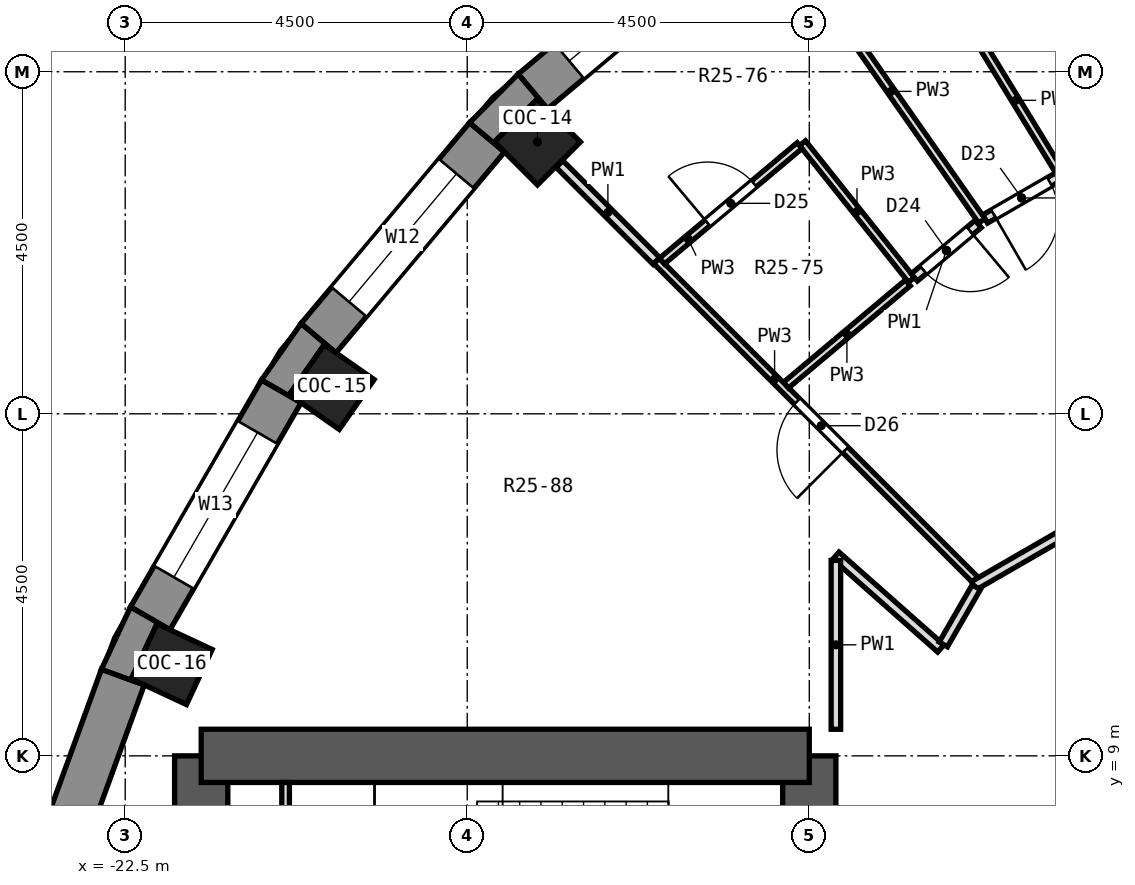
"""IFC4 building model, lengths in metres.
Left out: names, types, materials, properties, quantities, classifications, styles, units other than length and angle.
Written with IfcOpenShell. Run it as: python <this file> out.ifc"""

import sys

from ifc_helpers import new_model, si_unit, direction, frame, frame_2d, origin, origin_2d, place, context, subcontext, project, spatial, polyline, rectangle, outline, extrude, element, fill, save


model = new_model("IFC4")
c1 = context("Model", 3, precision=1e-05, world=origin(), true_north=direction((0.0, 1.0)))
c2 = subcontext(c1, "Body", "Model", "MODEL_VIEW")
j1 = project(units=[si_unit("LENGTHUNIT", "METRE"), si_unit("PLANEANGLEUNIT", "RADIAN")], contexts=[c1])
p1 = place(None, origin())
s1 = spatial("IfcSite", under=j1, at=p1, CompositionType="ELEMENT")
p2 = place(p1, origin())
s2 = spatial("IfcBuilding", under=s1, at=p2, CompositionType="ELEMENT")
p3 = place(p2, frame((0.0, 0.0, 160.8)))
s3 = spatial("IfcBuildingStorey", under=s2, at=p3, CompositionType="ELEMENT", Elevation=160.8)
for number, where, z_axis, x_axis in (
    (1, (-17.077, 17.077, 0.0), (0.0, 0.0, 1.0), (-0.707, 0.707, 0.0)),
    (2, (-19.782, 13.852, 0.0), (0.0, 0.0, 1.0), (-0.819, 0.574, 0.0)),
    (3, (-21.887, 10.206, 0.0), (0.0, 0.0, 1.0), (-0.906, 0.423, 0.0)),
):
    element("IfcColumn", number, at=place(p3, frame(where, z_axis=z_axis, x_axis=x_axis)), inside=s3, PredefinedType="COLUMN", context=c2, shape_type="SweptSolid", body=[
        extrude(rectangle(XDim=0.8, YDim=0.8, at=origin_2d()), origin(), (0.0, 0.0, 1.0), 3.3),
    ])
p4 = place(p3, frame((-13.5, -9.0, 0.0), z_axis=(0.0, 0.0, 1.0), x_axis=(0.0, 1.0, 0.0)))
e4 = element("IfcWall", 4, at=p4, inside=s3, PredefinedType="SHEAR", context=c2, shape_type="SweptSolid", body=[
    extrude(rectangle(XDim=18.0, YDim=0.7, at=frame_2d((9.0, 0.0))), origin(), (0.0, 0.0, 1.0), 3.3),
])
p5 = place(p4, frame((15.4, 0.0, 0.0)))
e5 = element("IfcOpeningElement", 5, at=p5, cuts=e4, PredefinedType="OPENING", context=c2, shape_type="SweptSolid", body=[
    extrude(rectangle(XDim=1.2, YDim=2.1, at=frame_2d((0.6, 1.05))), frame((0.0, 0.362, 0.0), z_axis=(0.0, -1.0, 0.0), x_axis=(1.0, 0.0, 0.0)), (0.0, 0.0, 1.0), 0.724),
])
p6 = place(p4, frame((1.4, 0.0, 0.0)))
e6 = element("IfcOpeningElement", 6, at=p6, cuts=e4, PredefinedType="OPENING", context=c2, shape_type="SweptSolid", body=[
    extrude(rectangle(XDim=1.2, YDim=2.1, at=frame_2d((0.6, 1.05))), frame((0.0, 0.362, 0.0), z_axis=(0.0, -1.0, 0.0), x_axis=(1.0, 0.0, 0.0)), (0.0, 0.0, 1.0), 0.724),
])
p7 = place(p4, frame((7.5, 0.0, 0.0)))
e7 = element("IfcOpeningElement", 7, at=p7, cuts=e4, PredefinedType="OPENING", context=c2, shape_type="SweptSolid", body=[
    extrude(rectangle(XDim=3.0, YDim=2.4, at=frame_2d((1.5, 1.2))), frame((0.0, 0.362, 0.0), z_axis=(0.0, -1.0, 0.0), x_axis=(1.0, 0.0, 0.0)), (0.0, 0.0, 1.0), 0.724),
])
p8 = place(p3, frame((-21.5, -9.0, 0.0), z_axis=(0.0, 0.0, 1.0), x_axis=(0.0, 1.0, 0.0)))
e8 = element("IfcWall", 8, at=p8, inside=s3, PredefinedType="SHEAR", context=c2, shape_type="SweptSolid", body=[
    extrude(rectangle(XDim=18.0, YDim=0.7, at=frame_2d((9.0, 0.0))), origin(), (0.0, 0.0, 1.0), 3.3),
])
p9 = place(p8, frame((9.45, 0.0, 0.0)))
e9 = element("IfcOpeningElement", 9, at=p9, cuts=e8, PredefinedType="OPENING", context=c2, shape_type="SweptSolid", body=[
    extrude(rectangle(XDim=0.9, YDim=2.1, at=frame_2d((0.45, 1.05))), frame((0.0, 0.362, 0.0), z_axis=(0.0, -1.0, 0.0), x_axis=(1.0, 0.0, 0.0)), (0.0, 0.0, 1.0), 0.724),
])
p10 = place(p8, frame((7.65, 0.0, 0.0)))
e10 = element("IfcOpeningElement", 10, at=p10, cuts=e8, PredefinedType="OPENING", context=c2, shape_type="SweptSolid", body=[
    extrude(rectangle(XDim=0.9, YDim=2.1, at=frame_2d((0.45, 1.05))), frame((0.0, 0.362, 0.0), z_axis=(0.0, -1.0, 0.0), x_axis=(1.0, 0.0, 0.0)), (0.0, 0.0, 1.0), 0.724),
])
p11 = place(p3, frame((-13.5, 9.0, 0.0), z_axis=(0.0, 0.0, 1.0), x_axis=(-1.0, 0.0, 0.0)))
e11 = element("IfcWall", 11, at=p11, inside=s3, PredefinedType="SHEAR", context=c2, shape_type="SweptSolid", body=[
    extrude(rectangle(XDim=8.0, YDim=0.7, at=frame_2d((4.0, 0.0))), origin(), (0.0, 0.0, 1.0), 3.3),
])
p12 = place(p3, frame((-14.494, 19.957, 0.0), z_axis=(0.0, 0.0, 1.0), x_axis=(-0.766058884809, -0.642770398358, 0.0)))
e12 = element("IfcWall", 12, at=p12, inside=s3, PredefinedType="SOLIDWALL", context=c2, shape_type="SweptSolid", body=[
    extrude(rectangle(XDim=3.449, YDim=0.6, at=frame_2d((1.725, 0.0))), origin(), (0.0, 0.0, 1.0), 2.85),
])
p13 = place(p12, frame((0.625, 0.0, 0.9)))
e13 = element("IfcOpeningElement", 13, at=p13, cuts=e12, PredefinedType="OPENING", context=c2, shape_type="SweptSolid", body=[
    extrude(rectangle(XDim=2.2, YDim=1.8, at=frame_2d((1.1, 0.9))), frame((0.0, 0.312, 0.0), z_axis=(0.0, -1.0, 0.0), x_axis=(1.0, 0.0, 0.0)), (0.0, 0.0, 1.0), 0.624),
])
p14 = place(p3, frame((-17.74, 17.137, 0.0), z_axis=(0.0, 0.0, 1.0), x_axis=(-0.642770398358, -0.766058884809, 0.0)))
e14 = element("IfcWall", 14, at=p14, inside=s3, PredefinedType="SOLIDWALL", context=c2, shape_type="SweptSolid", body=[
    extrude(rectangle(XDim=3.449, YDim=0.6, at=frame_2d((1.725, 0.0))), origin(), (0.0, 0.0, 1.0), 2.85),
])
p15 = place(p14, frame((0.625, 0.0, 0.9)))
e15 = element("IfcOpeningElement", 15, at=p15, cuts=e14, PredefinedType="OPENING", context=c2, shape_type="SweptSolid", body=[
    extrude(rectangle(XDim=2.2, YDim=1.8, at=frame_2d((1.1, 0.9))), frame((0.0, 0.312, 0.0), z_axis=(0.0, -1.0, 0.0), x_axis=(1.0, 0.0, 0.0)), (0.0, 0.0, 1.0), 0.624),
])
p16 = place(p3, frame((-20.446, 13.796, 0.0), z_axis=(0.0, 0.0, 1.0), x_axis=(-0.499998129301, -0.86602648383, 0.0)))
e16 = element("IfcWall", 16, at=p16, inside=s3, PredefinedType="SOLIDWALL", context=c2, shape_type="SweptSolid", body=[
    extrude(rectangle(XDim=3.45, YDim=0.6, at=frame_2d((1.725, 0.0))), origin(), (0.0, 0.0, 1.0), 2.85),
])
p17 = place(p16, frame((0.625, 0.0, 0.9)))
e17 = element("IfcOpeningElement", 17, at=p17, cuts=e16, PredefinedType="OPENING", context=c2, shape_type="SweptSolid", body=[
    extrude(rectangle(XDim=2.2, YDim=1.8, at=frame_2d((1.1, 0.9))), frame((0.0, 0.312, 0.0), z_axis=(0.0, -1.0, 0.0), x_axis=(1.0, 0.0, 0.0)), (0.0, 0.0, 1.0), 0.624),
])
p18 = place(p3, frame((-22.531, 10.036, 0.0), z_axis=(0.0, 0.0, 1.0), x_axis=(-0.342032843455, -0.93968799822, 0.0)))
e18 = element("IfcWall", 18, at=p18, inside=s3, PredefinedType="SOLIDWALL", context=c2, shape_type="SweptSolid", body=[
    extrude(rectangle(XDim=3.45, YDim=0.6, at=frame_2d((1.725, 0.0))), origin(), (0.0, 0.0, 1.0), 2.85),
])
p19 = place(p3, origin())
e19 = element("IfcWall", 19, at=p19, inside=s3, PredefinedType="SOLIDWALL", context=c2, shape_type="SweptSolid", body=[
    extrude(outline(polyline([(-17.969, 17.33), (-17.51, 16.944), (-17.642, 17.077), (-17.077, 17.642), (-16.944, 17.51), (-17.33, 17.969), (-17.969, 17.33)])), origin(), (0.0, 0.0, 1.0), 2.85),
])
p20 = place(p3, origin())
e20 = element("IfcWall", 20, at=p20, inside=s3, PredefinedType="SOLIDWALL", context=c2, shape_type="SweptSolid", body=[
    extrude(outline(polyline([(-20.187, 14.687), (-20.706, 13.946), (-20.186, 13.646), (-20.34, 13.754), (-19.881, 14.409), (-19.727, 14.302), (-20.187, 14.687)])), origin(), (0.0, 0.0, 1.0), 2.85),
])
p21 = place(p3, origin())
e21 = element("IfcWall", 21, at=p21, inside=s3, PredefinedType="SOLIDWALL", context=c2, shape_type="SweptSolid", body=[
    extrude(outline(polyline([(-22.813, 10.139), (-22.249, 9.934), (-22.419, 10.013), (-22.081, 10.738), (-21.911, 10.659), (-22.431, 10.959), (-22.813, 10.139)])), origin(), (0.0, 0.0, 1.0), 2.85),
])
p22 = place(p3, frame((-11.385, 18.605, 0.0), z_axis=(0.0, 0.0, 1.0), x_axis=(0.522076659847, -0.852898564451, 0.0)))
e22 = element("IfcWall", 22, at=p22, inside=s3, PredefinedType="PARTITIONING", context=c2, shape_type="SweptSolid", body=[
    extrude(rectangle(XDim=2.3, YDim=0.1, at=frame_2d((1.15, 0.0))), origin(), (0.0, 0.0, 1.0), 2.85),
])
p23 = place(p3, frame((-13.617, 19.447, 0.0), z_axis=(0.0, 0.0, 1.0), x_axis=(0.573631652668, -0.819113378634, 0.0)))
e23 = element("IfcWall", 23, at=p23, inside=s3, PredefinedType="PARTITIONING", context=c2, shape_type="SweptSolid", body=[
    extrude(rectangle(XDim=4.161, YDim=0.1, at=frame_2d((2.081, 0.0))), origin(), (0.0, 0.0, 1.0), 2.85),
])
p24 = place(p3, frame((-13.589, 17.061, 0.0), z_axis=(0.0, 0.0, 1.0), x_axis=(0.623062698495, -0.782171895266, 0.0)))
e24 = element("IfcWall", 24, at=p24, inside=s3, PredefinedType="PARTITIONING", context=c2, shape_type="SweptSolid", body=[
    extrude(rectangle(XDim=2.3, YDim=0.1, at=frame_2d((1.15, 0.0))), origin(), (0.0, 0.0, 1.0), 2.85),
])
p25 = place(p3, frame((-15.512, 15.512, 0.0), z_axis=(0.0, 0.0, 1.0), x_axis=(0.707106781187, -0.707106781187, 0.0)))
e25 = element("IfcWall", 25, at=p25, inside=s3, PredefinedType="PARTITIONING", context=c2, shape_type="SweptSolid", body=[
    extrude(rectangle(XDim=5.931, YDim=0.1, at=frame_2d((2.966, 0.0))), origin(), (0.0, 0.0, 1.0), 2.85),
])
p26 = place(p25, frame((2.617, 0.0, 0.0)))
e26 = element("IfcOpeningElement", 26, at=p26, cuts=e25, PredefinedType="OPENING", context=c2, shape_type="SweptSolid", body=[
    extrude(rectangle(XDim=0.9, YDim=2.1, at=frame_2d((0.45, 1.05))), frame((0.0, 0.062, 0.0), z_axis=(0.0, -1.0, 0.0), x_axis=(1.0, 0.0, 0.0)), (0.0, 0.0, 1.0), 0.124),
])
p27 = place(p3, frame((-16.787, 16.787, 0.0), z_axis=(0.0, 0.0, 1.0), x_axis=(0.707106781187, -0.707106781187, 0.0)))
e27 = element("IfcWall", 27, at=p27, inside=s3, PredefinedType="PARTITIONING", context=c2, shape_type="SweptSolid", body=[
    extrude(rectangle(XDim=1.802, YDim=0.125, at=frame_2d((0.901, 0.0))), origin(), (0.0, 0.0, 1.0), 2.85),
])
p28 = place(p3, frame((-13.15, 11.634, 0.0), z_axis=(0.0, 0.0, 1.0), x_axis=(0.748920683101, -0.662659649008, 0.0)))
e28 = element("IfcWall", 28, at=p28, inside=s3, PredefinedType="PARTITIONING", context=c2, shape_type="SweptSolid", body=[
    extrude(rectangle(XDim=1.843, YDim=0.125, at=frame_2d((0.921, 0.0))), origin(), (0.0, 0.0, 1.0), 2.85),
])
p29 = place(p3, frame((-11.336, 11.238, 0.0), z_axis=(0.0, 0.0, 1.0), x_axis=(0.866067506982, 0.499927068031, 0.0)))
e29 = element("IfcWall", 29, at=p29, inside=s3, PredefinedType="PARTITIONING", context=c2, shape_type="SweptSolid", body=[
    extrude(rectangle(XDim=8.263, YDim=0.125, at=frame_2d((4.131, 0.0))), origin(), (0.0, 0.0, 1.0), 2.85),
])
p30 = place(p3, frame((-11.187, 16.063, 0.0), z_axis=(0.0, 0.0, 1.0), x_axis=(0.865888396158, 0.500237229121, 0.0)))
e30 = element("IfcWall", 30, at=p30, inside=s3, PredefinedType="PARTITIONING", context=c2, shape_type="SweptSolid", body=[
    extrude(rectangle(XDim=1.108, YDim=0.125, at=frame_2d((0.554, 0.0))), origin(), (0.0, 0.0, 1.0), 2.85),
])
p31 = place(p30, frame((0.129, 0.0, 0.0)))
e31 = element("IfcOpeningElement", 31, at=p31, cuts=e30, PredefinedType="OPENING", context=c2, shape_type="SweptSolid", body=[
    extrude(rectangle(XDim=0.85, YDim=2.1, at=frame_2d((0.425, 1.05))), frame((0.0, 0.074, 0.0), z_axis=(0.0, -1.0, 0.0), x_axis=(1.0, 0.0, 0.0)), (0.0, 0.0, 1.0), 0.149),
])
p32 = place(p3, frame((-12.118, 15.294, 0.0), z_axis=(0.0, 0.0, 1.0), x_axis=(0.766831623153, 0.641848316764, 0.0)))
e32 = element("IfcWall", 32, at=p32, inside=s3, PredefinedType="PARTITIONING", context=c2, shape_type="SweptSolid", body=[
    extrude(rectangle(XDim=1.096, YDim=0.125, at=frame_2d((0.548, 0.0))), origin(), (0.0, 0.0, 1.0), 2.85),
])
p33 = place(p32, frame((0.154, 0.0, 0.0)))
e33 = element("IfcOpeningElement", 33, at=p33, cuts=e32, PredefinedType="OPENING", context=c2, shape_type="SweptSolid", body=[
    extrude(rectangle(XDim=0.8, YDim=2.1, at=frame_2d((0.4, 1.05))), frame((0.0, 0.074, 0.0), z_axis=(0.0, -1.0, 0.0), x_axis=(1.0, 0.0, 0.0)), (0.0, 0.0, 1.0), 0.149),
])
p34 = place(p3, frame((-13.806, 13.877, 0.0), z_axis=(0.0, 0.0, 1.0), x_axis=(0.766093288455, 0.64272939359, 0.0)))
e34 = element("IfcWall", 34, at=p34, inside=s3, PredefinedType="PARTITIONING", context=c2, shape_type="SweptSolid", body=[
    extrude(rectangle(XDim=2.092, YDim=0.1, at=frame_2d((1.046, 0.0))), origin(), (0.0, 0.0, 1.0), 2.85),
])
p35 = place(p3, frame((-15.438, 15.51, 0.0), z_axis=(0.0, 0.0, 1.0), x_axis=(0.766091436164, 0.642731601399, 0.0)))
e35 = element("IfcWall", 35, at=p35, inside=s3, PredefinedType="PARTITIONING", context=c2, shape_type="SweptSolid", body=[
    extrude(rectangle(XDim=2.363, YDim=0.1, at=frame_2d((1.182, 0.0))), origin(), (0.0, 0.0, 1.0), 2.85),
])
p36 = place(p35, frame((0.781, 0.0, 0.0)))
e36 = element("IfcOpeningElement", 36, at=p36, cuts=e35, PredefinedType="OPENING", context=c2, shape_type="SweptSolid", body=[
    extrude(rectangle(XDim=0.8, YDim=2.1, at=frame_2d((0.4, 1.05))), frame((0.0, 0.062, 0.0), z_axis=(0.0, -1.0, 0.0), x_axis=(1.0, 0.0, 0.0)), (0.0, 0.0, 1.0), 0.124),
])
p37 = place(p3, frame((-11.737, 10.466, 0.0), z_axis=(0.0, 0.0, 1.0), x_axis=(0.49949531882, 0.866316585595, 0.0)))
e37 = element("IfcWall", 37, at=p37, inside=s3, PredefinedType="PARTITIONING", context=c2, shape_type="SweptSolid", body=[
    extrude(rectangle(XDim=0.869, YDim=0.125, at=frame_2d((0.434, 0.0))), origin(), (0.0, 0.0, 1.0), 2.85),
])
p38 = place(p3, frame((-13.15, 9.35, 0.0), z_axis=(0.0, 0.0, 1.0), x_axis=(0.0, 1.0, 0.0)))
e38 = element("IfcWall", 38, at=p38, inside=s3, PredefinedType="PARTITIONING", context=c2, shape_type="SweptSolid", body=[
    extrude(rectangle(XDim=2.221, YDim=0.125, at=frame_2d((1.111, 0.0))), origin(), (0.0, 0.0, 1.0), 2.85),
])
p39 = place(p3, frame((-20.39, 5.2, 0.0), z_axis=(0.0, 0.0, 1.0), x_axis=(0.0, 1.0, 0.0)))
e39 = element("IfcWall", 39, at=p39, inside=s3, PredefinedType="PARTITIONING", context=c2, shape_type="SweptSolid", body=[
    extrude(rectangle(XDim=3.45, YDim=0.1, at=frame_2d((1.725, 0.0))), origin(), (0.0, 0.0, 1.0), 2.85),
])
p40 = place(p13, origin())
e40 = element("IfcWindow", 40, at=p40, inside=s3, PartitioningType="SINGLE_PANEL", PredefinedType="WINDOW", context=c2, shape_type="SweptSolid", body=[
    extrude(rectangle(XDim=2.2, YDim=1.8, at=frame_2d((1.1, 0.9))), frame((0.0, 0.18, 0.0), z_axis=(0.0, -1.0, 0.0), x_axis=(1.0, 0.0, 0.0)), (0.0, 0.0, 1.0), 0.06),
])
fill(e13, e40)
p41 = place(p15, origin())
e41 = element("IfcWindow", 41, at=p41, inside=s3, PartitioningType="SINGLE_PANEL", PredefinedType="WINDOW", context=c2, shape_type="SweptSolid", body=[
    extrude(rectangle(XDim=2.2, YDim=1.8, at=frame_2d((1.1, 0.9))), frame((0.0, 0.18, 0.0), z_axis=(0.0, -1.0, 0.0), x_axis=(1.0, 0.0, 0.0)), (0.0, 0.0, 1.0), 0.06),
])
fill(e15, e41)
p42 = place(p17, origin())
e42 = element("IfcWindow", 42, at=p42, inside=s3, PartitioningType="SINGLE_PANEL", PredefinedType="WINDOW", context=c2, shape_type="SweptSolid", body=[
    extrude(rectangle(XDim=2.2, YDim=1.8, at=frame_2d((1.1, 0.9))), frame((0.0, 0.18, 0.0), z_axis=(0.0, -1.0, 0.0), x_axis=(1.0, 0.0, 0.0)), (0.0, 0.0, 1.0), 0.06),
])
fill(e17, e42)
p43 = place(p31, frame((0.85, 0.0, 0.0), z_axis=(0.0, 0.0, 1.0), x_axis=(-1.0, 0.0, 0.0)))
e43 = element("IfcDoor", 43, at=p43, inside=s3, OperationType="SINGLE_SWING_RIGHT", PredefinedType="DOOR", context=c2, shape_type="SweptSolid", body=[
    extrude(rectangle(XDim=0.85, YDim=2.1, at=frame_2d((0.425, 1.05))), frame((0.0, 0.025, 0.0), z_axis=(0.0, -1.0, 0.0), x_axis=(1.0, 0.0, 0.0)), (0.0, 0.0, 1.0), 0.05),
])
fill(e31, e43)
p44 = place(p33, frame((0.8, 0.0, 0.0), z_axis=(0.0, 0.0, 1.0), x_axis=(-1.0, 0.0, 0.0)))
e44 = element("IfcDoor", 44, at=p44, inside=s3, OperationType="SINGLE_SWING_LEFT", PredefinedType="DOOR", context=c2, shape_type="SweptSolid", body=[
    extrude(rectangle(XDim=0.8, YDim=2.1, at=frame_2d((0.4, 1.05))), frame((0.0, 0.025, 0.0), z_axis=(0.0, -1.0, 0.0), x_axis=(1.0, 0.0, 0.0)), (0.0, 0.0, 1.0), 0.05),
])
fill(e33, e44)
p45 = place(p36, origin())
e45 = element("IfcDoor", 45, at=p45, inside=s3, OperationType="SINGLE_SWING_LEFT", PredefinedType="DOOR", context=c2, shape_type="SweptSolid", body=[
    extrude(rectangle(XDim=0.8, YDim=2.1, at=frame_2d((0.4, 1.05))), frame((0.0, 0.025, 0.0), z_axis=(0.0, -1.0, 0.0), x_axis=(1.0, 0.0, 0.0)), (0.0, 0.0, 1.0), 0.05),
])
fill(e36, e45)
p46 = place(p26, frame((0.9, 0.0, 0.0), z_axis=(0.0, 0.0, 1.0), x_axis=(-1.0, 0.0, 0.0)))
e46 = element("IfcDoor", 46, at=p46, inside=s3, OperationType="SINGLE_SWING_LEFT", PredefinedType="DOOR", context=c2, shape_type="SweptSolid", body=[
    extrude(rectangle(XDim=0.9, YDim=2.1, at=frame_2d((0.45, 1.05))), frame((0.0, 0.025, 0.0), z_axis=(0.0, -1.0, 0.0), x_axis=(1.0, 0.0, 0.0)), (0.0, 0.0, 1.0), 0.05),
])
fill(e26, e46)
save(model, sys.argv[1])
